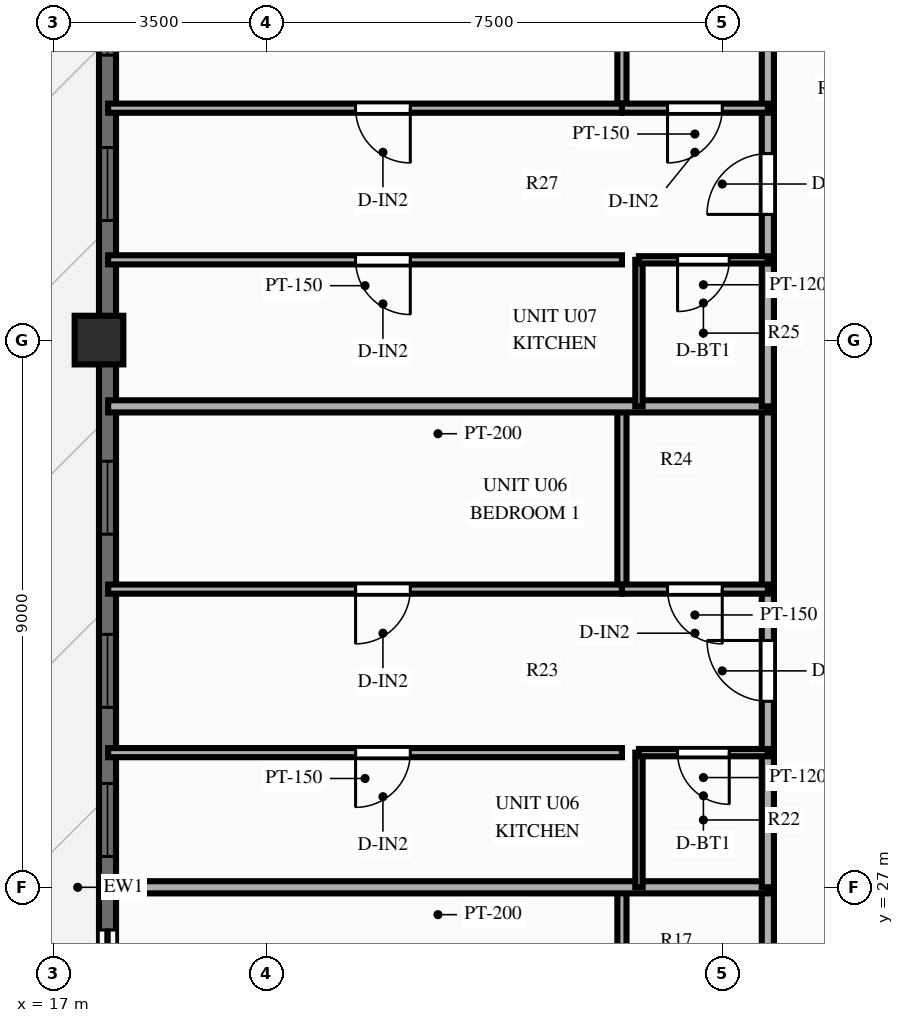
"""IFC4 building model, lengths in metres.
Left out: names, types, materials, properties, quantities, classifications, styles, units other than length and angle.
Written with IfcOpenShell. Run it as: python <this file> out.ifc"""

import sys

from ifc_helpers import new_model, si_unit, direction, frame, frame_2d, origin, origin_2d, place, context, subcontext, project, spatial, rectangle, extrude, source, transform, mapped, element, fill, save


model = new_model("IFC4")
c1 = context("Model", 3, precision=1e-05, world=origin(), true_north=direction((0.0, 1.0)))
c2 = subcontext(c1, "Body", "Model", "MODEL_VIEW")
j1 = project(units=[si_unit("LENGTHUNIT", "METRE"), si_unit("PLANEANGLEUNIT", "RADIAN")], contexts=[c1])
p1 = place(None, origin())
s1 = spatial("IfcSite", under=j1, at=p1, CompositionType="ELEMENT")
p2 = place(p1, origin())
s2 = spatial("IfcBuilding", under=s1, at=p2, CompositionType="ELEMENT")
p3 = place(p2, frame((0.0, 0.0, 186.7)))
s3 = spatial("IfcBuildingStorey", under=s2, at=p3, CompositionType="ELEMENT", Elevation=186.7)
m1 = source(origin(), c2, "Body", "SweptSolid", [
    extrude(rectangle(XDim=0.8, YDim=0.8, at=origin_2d()), origin(), (0.0, 0.0, 1.0), 3.0),
])
p4 = place(p3, frame((17.75, 36.0, 0.0), z_axis=(0.0, 0.0, 1.0), x_axis=(1.0, 0.0, 0.0)))
e1 = element("IfcColumn", 1, at=p4, inside=s3, PredefinedType="COLUMN", context=c2, shape_type="MappedRepresentation", body=[
    mapped(m1, transform((0.0, 0.0, 0.0), scale=1.0)),
])
p5 = place(p3, frame((17.89, 11.0, 0.0), z_axis=(0.0, 0.0, 1.0), x_axis=(0.0, 1.0, 0.0)))
e2 = element("IfcWall", 2, at=p5, inside=s3, PredefinedType="SOLIDWALL", context=c2, shape_type="SweptSolid", body=[
    extrude(rectangle(XDim=32.0, YDim=0.28, at=frame_2d((16.0, 0.0))), origin(), (0.0, 0.0, 1.0), 2.28),
])
p6 = place(p5, frame((0.717, 0.0, 0.25)))
e3 = element("IfcOpeningElement", 3, at=p6, cuts=e2, PredefinedType="OPENING", context=c2, shape_type="SweptSolid", body=[
    extrude(rectangle(XDim=1.2, YDim=1.5, at=frame_2d((0.6, 0.75))), frame((0.0, 0.152, 0.0), z_axis=(0.0, -1.0, 0.0), x_axis=(1.0, 0.0, 0.0)), (0.0, 0.0, 1.0), 0.304),
])
p7 = place(p5, frame((3.139, 0.0, 0.25)))
e4 = element("IfcOpeningElement", 4, at=p7, cuts=e2, PredefinedType="OPENING", context=c2, shape_type="SweptSolid", body=[
    extrude(rectangle(XDim=1.2, YDim=1.5, at=frame_2d((0.6, 0.75))), frame((0.0, 0.152, 0.0), z_axis=(0.0, -1.0, 0.0), x_axis=(1.0, 0.0, 0.0)), (0.0, 0.0, 1.0), 0.304),
])
p8 = place(p5, frame((5.447, 0.0, 0.25)))
e5 = element("IfcOpeningElement", 5, at=p8, cuts=e2, PredefinedType="OPENING", context=c2, shape_type="SweptSolid", body=[
    extrude(rectangle(XDim=0.95, YDim=1.5, at=frame_2d((0.475, 0.75))), frame((0.0, 0.152, 0.0), z_axis=(0.0, -1.0, 0.0), x_axis=(1.0, 0.0, 0.0)), (0.0, 0.0, 1.0), 0.304),
])
p9 = place(p5, frame((8.597, 0.0, 0.25)))
e6 = element("IfcOpeningElement", 6, at=p9, cuts=e2, PredefinedType="OPENING", context=c2, shape_type="SweptSolid", body=[
    extrude(rectangle(XDim=1.2, YDim=1.5, at=frame_2d((0.6, 0.75))), frame((0.0, 0.152, 0.0), z_axis=(0.0, -1.0, 0.0), x_axis=(1.0, 0.0, 0.0)), (0.0, 0.0, 1.0), 0.304),
])
p10 = place(p5, frame((11.05, 0.0, 0.25)))
e7 = element("IfcOpeningElement", 7, at=p10, cuts=e2, PredefinedType="OPENING", context=c2, shape_type="SweptSolid", body=[
    extrude(rectangle(XDim=1.2, YDim=1.5, at=frame_2d((0.6, 0.75))), frame((0.0, 0.152, 0.0), z_axis=(0.0, -1.0, 0.0), x_axis=(1.0, 0.0, 0.0)), (0.0, 0.0, 1.0), 0.304),
])
p11 = place(p5, frame((13.697, 0.0, 0.0)))
e8 = element("IfcOpeningElement", 8, at=p11, cuts=e2, PredefinedType="OPENING", context=c2, shape_type="SweptSolid", body=[
    extrude(rectangle(XDim=1.6, YDim=2.15, at=frame_2d((0.8, 1.075))), frame((0.0, 0.152, 0.0), z_axis=(0.0, -1.0, 0.0), x_axis=(1.0, 0.0, 0.0)), (0.0, 0.0, 1.0), 0.304),
])
p12 = place(p5, frame((16.507, 0.0, 0.25)))
e9 = element("IfcOpeningElement", 9, at=p12, cuts=e2, PredefinedType="OPENING", context=c2, shape_type="SweptSolid", body=[
    extrude(rectangle(XDim=1.2, YDim=1.5, at=frame_2d((0.6, 0.75))), frame((0.0, 0.152, 0.0), z_axis=(0.0, -1.0, 0.0), x_axis=(1.0, 0.0, 0.0)), (0.0, 0.0, 1.0), 0.304),
])
p13 = place(p5, frame((18.959, 0.0, 0.25)))
e10 = element("IfcOpeningElement", 10, at=p13, cuts=e2, PredefinedType="OPENING", context=c2, shape_type="SweptSolid", body=[
    extrude(rectangle(XDim=1.2, YDim=1.5, at=frame_2d((0.6, 0.75))), frame((0.0, 0.152, 0.0), z_axis=(0.0, -1.0, 0.0), x_axis=(1.0, 0.0, 0.0)), (0.0, 0.0, 1.0), 0.304),
])
p14 = place(p5, frame((21.807, 0.0, 0.25)))
e11 = element("IfcOpeningElement", 11, at=p14, cuts=e2, PredefinedType="OPENING", context=c2, shape_type="SweptSolid", body=[
    extrude(rectangle(XDim=1.2, YDim=1.5, at=frame_2d((0.6, 0.75))), frame((0.0, 0.152, 0.0), z_axis=(0.0, -1.0, 0.0), x_axis=(1.0, 0.0, 0.0)), (0.0, 0.0, 1.0), 0.304),
])
p15 = place(p5, frame((26.967, 0.0, 0.25)))
e12 = element("IfcOpeningElement", 12, at=p15, cuts=e2, PredefinedType="OPENING", context=c2, shape_type="SweptSolid", body=[
    extrude(rectangle(XDim=1.2, YDim=1.5, at=frame_2d((0.6, 0.75))), frame((0.0, 0.152, 0.0), z_axis=(0.0, -1.0, 0.0), x_axis=(1.0, 0.0, 0.0)), (0.0, 0.0, 1.0), 0.304),
])
p16 = place(p5, frame((29.687, 0.0, 0.25)))
e13 = element("IfcOpeningElement", 13, at=p16, cuts=e2, PredefinedType="OPENING", context=c2, shape_type="SweptSolid", body=[
    extrude(rectangle(XDim=1.2, YDim=1.5, at=frame_2d((0.6, 0.75))), frame((0.0, 0.152, 0.0), z_axis=(0.0, -1.0, 0.0), x_axis=(1.0, 0.0, 0.0)), (0.0, 0.0, 1.0), 0.304),
])
p17 = place(p3, frame((28.75, 23.994, 0.0), z_axis=(0.0, 0.0, 1.0), x_axis=(0.0, 1.0, 0.0)))
e14 = element("IfcWall", 14, at=p17, inside=s3, PredefinedType="PARTITIONING", context=c2, shape_type="SweptSolid", body=[
    extrude(rectangle(XDim=3.006, YDim=0.2, at=frame_2d((1.503, 0.0))), origin(), (0.0, 0.0, 1.0), 2.79),
])
p18 = place(p3, frame((26.35, 23.994, 0.0), z_axis=(0.0, 0.0, 1.0), x_axis=(0.0, 1.0, 0.0)))
e15 = element("IfcWall", 15, at=p18, inside=s3, PredefinedType="PARTITIONING", context=c2, shape_type="SweptSolid", body=[
    extrude(rectangle(XDim=3.006, YDim=0.15, at=frame_2d((1.503, 0.0))), origin(), (0.0, 0.0, 1.0), 2.79),
])
p19 = place(p3, frame((28.75, 27.0, 0.0), z_axis=(0.0, 0.0, 1.0), x_axis=(-1.0, 0.0, 0.0)))
e16 = element("IfcWall", 16, at=p19, inside=s3, PredefinedType="PARTITIONING", context=c2, shape_type="SweptSolid", body=[
    extrude(rectangle(XDim=10.85, YDim=0.2, at=frame_2d((5.425, 0.0))), origin(), (0.0, 0.0, 1.0), 2.79),
])
p20 = place(p3, frame((28.75, 27.0, 0.0), z_axis=(0.0, 0.0, 1.0), x_axis=(0.0, 1.0, 0.0)))
e17 = element("IfcWall", 17, at=p20, inside=s3, PredefinedType="PARTITIONING", context=c2, shape_type="SweptSolid", body=[
    extrude(rectangle(XDim=2.215, YDim=0.2, at=frame_2d((1.107, 0.0))), origin(), (0.0, 0.0, 1.0), 2.79),
])
p21 = place(p3, frame((28.75, 29.215, 0.0), z_axis=(0.0, 0.0, 1.0), x_axis=(0.0, 1.0, 0.0)))
e18 = element("IfcWall", 18, at=p21, inside=s3, PredefinedType="PARTITIONING", context=c2, shape_type="SweptSolid", body=[
    extrude(rectangle(XDim=2.689, YDim=0.2, at=frame_2d((1.345, 0.0))), origin(), (0.0, 0.0, 1.0), 2.79),
])
p22 = place(p21, frame((0.845, 0.0, 0.0)))
e19 = element("IfcOpeningElement", 19, at=p22, cuts=e18, PredefinedType="OPENING", context=c2, shape_type="SweptSolid", body=[
    extrude(rectangle(XDim=1.0, YDim=2.15, at=frame_2d((0.5, 1.075))), frame((0.0, 0.112, 0.0), z_axis=(0.0, -1.0, 0.0), x_axis=(1.0, 0.0, 0.0)), (0.0, 0.0, 1.0), 0.224),
])
p23 = place(p3, frame((28.75, 31.904, 0.0), z_axis=(0.0, 0.0, 1.0), x_axis=(0.0, 1.0, 0.0)))
e20 = element("IfcWall", 20, at=p23, inside=s3, PredefinedType="PARTITIONING", context=c2, shape_type="SweptSolid", body=[
    extrude(rectangle(XDim=3.006, YDim=0.2, at=frame_2d((1.503, 0.0))), origin(), (0.0, 0.0, 1.0), 2.79),
])
p24 = place(p3, frame((26.63, 27.0, 0.0), z_axis=(0.0, 0.0, 1.0), x_axis=(0.0, 1.0, 0.0)))
e21 = element("IfcWall", 21, at=p24, inside=s3, PredefinedType="PARTITIONING", context=c2, shape_type="SweptSolid", body=[
    extrude(rectangle(XDim=2.215, YDim=0.12, at=frame_2d((1.107, 0.0))), origin(), (0.0, 0.0, 1.0), 2.79),
])
p25 = place(p3, frame((26.35, 31.904, 0.0), z_axis=(0.0, 0.0, 1.0), x_axis=(0.0, 1.0, 0.0)))
e22 = element("IfcWall", 22, at=p25, inside=s3, PredefinedType="PARTITIONING", context=c2, shape_type="SweptSolid", body=[
    extrude(rectangle(XDim=3.006, YDim=0.15, at=frame_2d((1.503, 0.0))), origin(), (0.0, 0.0, 1.0), 2.79),
])
p26 = place(p3, frame((28.75, 29.215, 0.0), z_axis=(0.0, 0.0, 1.0), x_axis=(-1.0, 0.0, 0.0)))
e23 = element("IfcWall", 23, at=p26, inside=s3, PredefinedType="PARTITIONING", context=c2, shape_type="SweptSolid", body=[
    extrude(rectangle(XDim=2.12, YDim=0.12, at=frame_2d((1.06, 0.0))), origin(), (0.0, 0.0, 1.0), 2.79),
])
p27 = place(p26, frame((0.635, 0.0, 0.0)))
e24 = element("IfcOpeningElement", 24, at=p27, cuts=e23, PredefinedType="OPENING", context=c2, shape_type="SweptSolid", body=[
    extrude(rectangle(XDim=0.85, YDim=2.05, at=frame_2d((0.425, 1.025))), frame((0.0, 0.072, 0.0), z_axis=(0.0, -1.0, 0.0), x_axis=(1.0, 0.0, 0.0)), (0.0, 0.0, 1.0), 0.144),
])
p28 = place(p3, frame((26.35, 29.215, 0.0), z_axis=(0.0, 0.0, 1.0), x_axis=(-1.0, 0.0, 0.0)))
e25 = element("IfcWall", 25, at=p28, inside=s3, PredefinedType="PARTITIONING", context=c2, shape_type="SweptSolid", body=[
    extrude(rectangle(XDim=8.45, YDim=0.15, at=frame_2d((4.225, 0.0))), origin(), (0.0, 0.0, 1.0), 2.79),
])
p29 = place(p28, frame((3.48, 0.0, 0.0)))
e26 = element("IfcOpeningElement", 26, at=p29, cuts=e25, PredefinedType="OPENING", context=c2, shape_type="SweptSolid", body=[
    extrude(rectangle(XDim=0.9, YDim=2.1, at=frame_2d((0.45, 1.05))), frame((0.0, 0.087, 0.0), z_axis=(0.0, -1.0, 0.0), x_axis=(1.0, 0.0, 0.0)), (0.0, 0.0, 1.0), 0.174),
])
p30 = place(p3, frame((28.75, 31.904, 0.0), z_axis=(0.0, 0.0, 1.0), x_axis=(-1.0, 0.0, 0.0)))
e27 = element("IfcWall", 27, at=p30, inside=s3, PredefinedType="PARTITIONING", context=c2, shape_type="SweptSolid", body=[
    extrude(rectangle(XDim=2.4, YDim=0.15, at=frame_2d((1.2, 0.0))), origin(), (0.0, 0.0, 1.0), 2.39),
])
p31 = place(p30, frame((0.75, 0.0, 0.0)))
e28 = element("IfcOpeningElement", 28, at=p31, cuts=e27, PredefinedType="OPENING", context=c2, shape_type="SweptSolid", body=[
    extrude(rectangle(XDim=0.9, YDim=2.1, at=frame_2d((0.45, 1.05))), frame((0.0, 0.087, 0.0), z_axis=(0.0, -1.0, 0.0), x_axis=(1.0, 0.0, 0.0)), (0.0, 0.0, 1.0), 0.174),
])
p32 = place(p3, frame((26.35, 31.904, 0.0), z_axis=(0.0, 0.0, 1.0), x_axis=(-1.0, 0.0, 0.0)))
e29 = element("IfcWall", 29, at=p32, inside=s3, PredefinedType="PARTITIONING", context=c2, shape_type="SweptSolid", body=[
    extrude(rectangle(XDim=8.45, YDim=0.15, at=frame_2d((4.225, 0.0))), origin(), (0.0, 0.0, 1.0), 2.39),
])
p33 = place(p32, frame((3.48, 0.0, 0.0)))
e30 = element("IfcOpeningElement", 30, at=p33, cuts=e29, PredefinedType="OPENING", context=c2, shape_type="SweptSolid", body=[
    extrude(rectangle(XDim=0.9, YDim=2.1, at=frame_2d((0.45, 1.05))), frame((0.0, 0.087, 0.0), z_axis=(0.0, -1.0, 0.0), x_axis=(1.0, 0.0, 0.0)), (0.0, 0.0, 1.0), 0.174),
])
p34 = place(p3, frame((28.75, 34.91, 0.0), z_axis=(0.0, 0.0, 1.0), x_axis=(-1.0, 0.0, 0.0)))
e31 = element("IfcWall", 31, at=p34, inside=s3, PredefinedType="PARTITIONING", context=c2, shape_type="SweptSolid", body=[
    extrude(rectangle(XDim=10.85, YDim=0.2, at=frame_2d((5.425, 0.0))), origin(), (0.0, 0.0, 1.0), 2.79),
])
p35 = place(p3, frame((28.75, 34.91, 0.0), z_axis=(0.0, 0.0, 1.0), x_axis=(0.0, 1.0, 0.0)))
e32 = element("IfcWall", 32, at=p35, inside=s3, PredefinedType="PARTITIONING", context=c2, shape_type="SweptSolid", body=[
    extrude(rectangle(XDim=2.41, YDim=0.2, at=frame_2d((1.205, 0.0))), origin(), (0.0, 0.0, 1.0), 2.79),
])
p36 = place(p3, frame((28.75, 37.32, 0.0), z_axis=(0.0, 0.0, 1.0), x_axis=(0.0, 1.0, 0.0)))
e33 = element("IfcWall", 33, at=p36, inside=s3, PredefinedType="PARTITIONING", context=c2, shape_type="SweptSolid", body=[
    extrude(rectangle(XDim=2.494, YDim=0.2, at=frame_2d((1.247, 0.0))), origin(), (0.0, 0.0, 1.0), 2.79),
])
p37 = place(p36, frame((0.747, 0.0, 0.0)))
e34 = element("IfcOpeningElement", 34, at=p37, cuts=e33, PredefinedType="OPENING", context=c2, shape_type="SweptSolid", body=[
    extrude(rectangle(XDim=1.0, YDim=2.15, at=frame_2d((0.5, 1.075))), frame((0.0, 0.112, 0.0), z_axis=(0.0, -1.0, 0.0), x_axis=(1.0, 0.0, 0.0)), (0.0, 0.0, 1.0), 0.224),
])
p38 = place(p3, frame((28.75, 39.814, 0.0), z_axis=(0.0, 0.0, 1.0), x_axis=(0.0, 1.0, 0.0)))
e35 = element("IfcWall", 35, at=p38, inside=s3, PredefinedType="PARTITIONING", context=c2, shape_type="SweptSolid", body=[
    extrude(rectangle(XDim=3.006, YDim=0.2, at=frame_2d((1.503, 0.0))), origin(), (0.0, 0.0, 1.0), 2.79),
])
p39 = place(p3, frame((26.63, 34.91, 0.0), z_axis=(0.0, 0.0, 1.0), x_axis=(0.0, 1.0, 0.0)))
e36 = element("IfcWall", 36, at=p39, inside=s3, PredefinedType="PARTITIONING", context=c2, shape_type="SweptSolid", body=[
    extrude(rectangle(XDim=2.41, YDim=0.12, at=frame_2d((1.205, 0.0))), origin(), (0.0, 0.0, 1.0), 2.79),
])
p40 = place(p3, frame((26.35, 39.814, 0.0), z_axis=(0.0, 0.0, 1.0), x_axis=(0.0, 1.0, 0.0)))
e37 = element("IfcWall", 37, at=p40, inside=s3, PredefinedType="PARTITIONING", context=c2, shape_type="SweptSolid", body=[
    extrude(rectangle(XDim=3.006, YDim=0.15, at=frame_2d((1.503, 0.0))), origin(), (0.0, 0.0, 1.0), 2.79),
])
p41 = place(p3, frame((28.75, 37.32, 0.0), z_axis=(0.0, 0.0, 1.0), x_axis=(-1.0, 0.0, 0.0)))
e38 = element("IfcWall", 38, at=p41, inside=s3, PredefinedType="PARTITIONING", context=c2, shape_type="SweptSolid", body=[
    extrude(rectangle(XDim=2.12, YDim=0.12, at=frame_2d((1.06, 0.0))), origin(), (0.0, 0.0, 1.0), 2.79),
])
p42 = place(p41, frame((0.635, 0.0, 0.0)))
e39 = element("IfcOpeningElement", 39, at=p42, cuts=e38, PredefinedType="OPENING", context=c2, shape_type="SweptSolid", body=[
    extrude(rectangle(XDim=0.85, YDim=2.05, at=frame_2d((0.425, 1.025))), frame((0.0, 0.072, 0.0), z_axis=(0.0, -1.0, 0.0), x_axis=(1.0, 0.0, 0.0)), (0.0, 0.0, 1.0), 0.144),
])
p43 = place(p3, frame((26.35, 37.32, 0.0), z_axis=(0.0, 0.0, 1.0), x_axis=(-1.0, 0.0, 0.0)))
e40 = element("IfcWall", 40, at=p43, inside=s3, PredefinedType="PARTITIONING", context=c2, shape_type="SweptSolid", body=[
    extrude(rectangle(XDim=8.45, YDim=0.15, at=frame_2d((4.225, 0.0))), origin(), (0.0, 0.0, 1.0), 2.79),
])
p44 = place(p43, frame((3.48, 0.0, 0.0)))
e41 = element("IfcOpeningElement", 41, at=p44, cuts=e40, PredefinedType="OPENING", context=c2, shape_type="SweptSolid", body=[
    extrude(rectangle(XDim=0.9, YDim=2.1, at=frame_2d((0.45, 1.05))), frame((0.0, 0.087, 0.0), z_axis=(0.0, -1.0, 0.0), x_axis=(1.0, 0.0, 0.0)), (0.0, 0.0, 1.0), 0.174),
])
p45 = place(p3, frame((28.75, 39.814, 0.0), z_axis=(0.0, 0.0, 1.0), x_axis=(-1.0, 0.0, 0.0)))
e42 = element("IfcWall", 42, at=p45, inside=s3, PredefinedType="PARTITIONING", context=c2, shape_type="SweptSolid", body=[
    extrude(rectangle(XDim=2.4, YDim=0.15, at=frame_2d((1.2, 0.0))), origin(), (0.0, 0.0, 1.0), 2.79),
])
p46 = place(p45, frame((0.75, 0.0, 0.0)))
e43 = element("IfcOpeningElement", 43, at=p46, cuts=e42, PredefinedType="OPENING", context=c2, shape_type="SweptSolid", body=[
    extrude(rectangle(XDim=0.9, YDim=2.1, at=frame_2d((0.45, 1.05))), frame((0.0, 0.087, 0.0), z_axis=(0.0, -1.0, 0.0), x_axis=(1.0, 0.0, 0.0)), (0.0, 0.0, 1.0), 0.174),
])
p47 = place(p3, frame((26.35, 39.814, 0.0), z_axis=(0.0, 0.0, 1.0), x_axis=(-1.0, 0.0, 0.0)))
e44 = element("IfcWall", 44, at=p47, inside=s3, PredefinedType="PARTITIONING", context=c2, shape_type="SweptSolid", body=[
    extrude(rectangle(XDim=8.45, YDim=0.15, at=frame_2d((4.225, 0.0))), origin(), (0.0, 0.0, 1.0), 2.79),
])
p48 = place(p47, frame((3.48, 0.0, 0.0)))
e45 = element("IfcOpeningElement", 45, at=p48, cuts=e44, PredefinedType="OPENING", context=c2, shape_type="SweptSolid", body=[
    extrude(rectangle(XDim=0.9, YDim=2.1, at=frame_2d((0.45, 1.05))), frame((0.0, 0.087, 0.0), z_axis=(0.0, -1.0, 0.0), x_axis=(1.0, 0.0, 0.0)), (0.0, 0.0, 1.0), 0.174),
])
m2 = source(origin(), c2, "Body", "SweptSolid", [
    extrude(rectangle(XDim=1.6, YDim=2.15, at=frame_2d((0.8, 1.075))), frame((0.0, 0.025, 0.0), z_axis=(0.0, -1.0, 0.0), x_axis=(1.0, 0.0, 0.0)), (0.0, 0.0, 1.0), 0.05),
])
p49 = place(p11, origin())
e46 = element("IfcDoor", 46, at=p49, inside=s3, OperationType="SLIDING_TO_LEFT", PredefinedType="DOOR", context=c2, shape_type="MappedRepresentation", body=[
    mapped(m2, transform((0.0, 0.0, 0.0), scale=1.0)),
])
fill(e8, e46)
m3 = source(origin(), c2, "Body", "SweptSolid", [
    extrude(rectangle(XDim=1.2, YDim=1.5, at=frame_2d((0.6, 0.75))), frame((0.0, 0.03, 0.0), z_axis=(0.0, -1.0, 0.0), x_axis=(1.0, 0.0, 0.0)), (0.0, 0.0, 1.0), 0.06),
])
p50 = place(p12, origin())
e47 = element("IfcWindow", 47, at=p50, inside=s3, PartitioningType="SINGLE_PANEL", PredefinedType="WINDOW", context=c2, shape_type="MappedRepresentation", body=[
    mapped(m3, transform((0.0, 0.0, 0.0), scale=1.0)),
])
fill(e9, e47)
p51 = place(p13, origin())
e48 = element("IfcWindow", 48, at=p51, inside=s3, PartitioningType="SINGLE_PANEL", PredefinedType="WINDOW", context=c2, shape_type="MappedRepresentation", body=[
    mapped(m3, transform((0.0, 0.0, 0.0), scale=1.0)),
])
fill(e10, e48)
p52 = place(p14, origin())
e49 = element("IfcWindow", 49, at=p52, inside=s3, PartitioningType="SINGLE_PANEL", PredefinedType="WINDOW", context=c2, shape_type="MappedRepresentation", body=[
    mapped(m3, transform((0.0, 0.0, 0.0), scale=1.0)),
])
fill(e11, e49)
p53 = place(p15, origin())
e50 = element("IfcWindow", 50, at=p53, inside=s3, PartitioningType="SINGLE_PANEL", PredefinedType="WINDOW", context=c2, shape_type="MappedRepresentation", body=[
    mapped(m3, transform((0.0, 0.0, 0.0), scale=1.0)),
])
fill(e12, e50)
p54 = place(p16, origin())
e51 = element("IfcWindow", 51, at=p54, inside=s3, PartitioningType="SINGLE_PANEL", PredefinedType="WINDOW", context=c2, shape_type="MappedRepresentation", body=[
    mapped(m3, transform((0.0, 0.0, 0.0), scale=1.0)),
])
fill(e13, e51)
m4 = source(origin(), c2, "Body", "SweptSolid", [
    extrude(rectangle(XDim=1.0, YDim=2.15, at=frame_2d((0.5, 1.075))), frame((0.0, 0.025, 0.0), z_axis=(0.0, -1.0, 0.0), x_axis=(1.0, 0.0, 0.0)), (0.0, 0.0, 1.0), 0.05),
])
p55 = place(p22, origin())
e52 = element("IfcDoor", 52, at=p55, inside=s3, OperationType="SINGLE_SWING_RIGHT", PredefinedType="DOOR", context=c2, shape_type="MappedRepresentation", body=[
    mapped(m4, transform((0.0, 0.0, 0.0), scale=1.0)),
])
fill(e19, e52)
m5 = source(origin(), c2, "Body", "SweptSolid", [
    extrude(rectangle(XDim=0.85, YDim=2.05, at=frame_2d((0.425, 1.025))), frame((0.0, 0.025, 0.0), z_axis=(0.0, -1.0, 0.0), x_axis=(1.0, 0.0, 0.0)), (0.0, 0.0, 1.0), 0.05),
])
p56 = place(p27, origin())
e53 = element("IfcDoor", 53, at=p56, inside=s3, OperationType="SINGLE_SWING_LEFT", PredefinedType="DOOR", context=c2, shape_type="MappedRepresentation", body=[
    mapped(m5, transform((0.0, 0.0, 0.0), scale=1.0)),
])
fill(e24, e53)
m6 = source(origin(), c2, "Body", "SweptSolid", [
    extrude(rectangle(XDim=0.9, YDim=2.1, at=frame_2d((0.45, 1.05))), frame((0.0, 0.025, 0.0), z_axis=(0.0, -1.0, 0.0), x_axis=(1.0, 0.0, 0.0)), (0.0, 0.0, 1.0), 0.05),
])
p57 = place(p29, origin())
e54 = element("IfcDoor", 54, at=p57, inside=s3, OperationType="SINGLE_SWING_RIGHT", PredefinedType="DOOR", context=c2, shape_type="MappedRepresentation", body=[
    mapped(m6, transform((0.0, 0.0, 0.0), scale=1.0)),
])
fill(e26, e54)
p58 = place(p31, origin())
e55 = element("IfcDoor", 55, at=p58, inside=s3, OperationType="SINGLE_SWING_LEFT", PredefinedType="DOOR", context=c2, shape_type="MappedRepresentation", body=[
    mapped(m6, transform((0.0, 0.0, 0.0), scale=1.0)),
])
fill(e28, e55)
p59 = place(p33, origin())
e56 = element("IfcDoor", 56, at=p59, inside=s3, OperationType="SINGLE_SWING_RIGHT", PredefinedType="DOOR", context=c2, shape_type="MappedRepresentation", body=[
    mapped(m6, transform((0.0, 0.0, 0.0), scale=1.0)),
])
fill(e30, e56)
p60 = place(p37, origin())
e57 = element("IfcDoor", 57, at=p60, inside=s3, OperationType="SINGLE_SWING_LEFT", PredefinedType="DOOR", context=c2, shape_type="MappedRepresentation", body=[
    mapped(m4, transform((0.0, 0.0, 0.0), scale=1.0)),
])
fill(e34, e57)
p61 = place(p42, origin())
e58 = element("IfcDoor", 58, at=p61, inside=s3, OperationType="SINGLE_SWING_RIGHT", PredefinedType="DOOR", context=c2, shape_type="MappedRepresentation", body=[
    mapped(m5, transform((0.0, 0.0, 0.0), scale=1.0)),
])
fill(e39, e58)
p62 = place(p44, origin())
e59 = element("IfcDoor", 59, at=p62, inside=s3, OperationType="SINGLE_SWING_LEFT", PredefinedType="DOOR", context=c2, shape_type="MappedRepresentation", body=[
    mapped(m6, transform((0.0, 0.0, 0.0), scale=1.0)),
])
fill(e41, e59)
p63 = place(p46, origin())
e60 = element("IfcDoor", 60, at=p63, inside=s3, OperationType="SINGLE_SWING_RIGHT", PredefinedType="DOOR", context=c2, shape_type="MappedRepresentation", body=[
    mapped(m6, transform((0.0, 0.0, 0.0), scale=1.0)),
])
fill(e43, e60)
p64 = place(p48, origin())
e61 = element("IfcDoor", 61, at=p64, inside=s3, OperationType="SINGLE_SWING_LEFT", PredefinedType="DOOR", context=c2, shape_type="MappedRepresentation", body=[
    mapped(m6, transform((0.0, 0.0, 0.0), scale=1.0)),
])
fill(e45, e61)
save(model, sys.argv[1])
